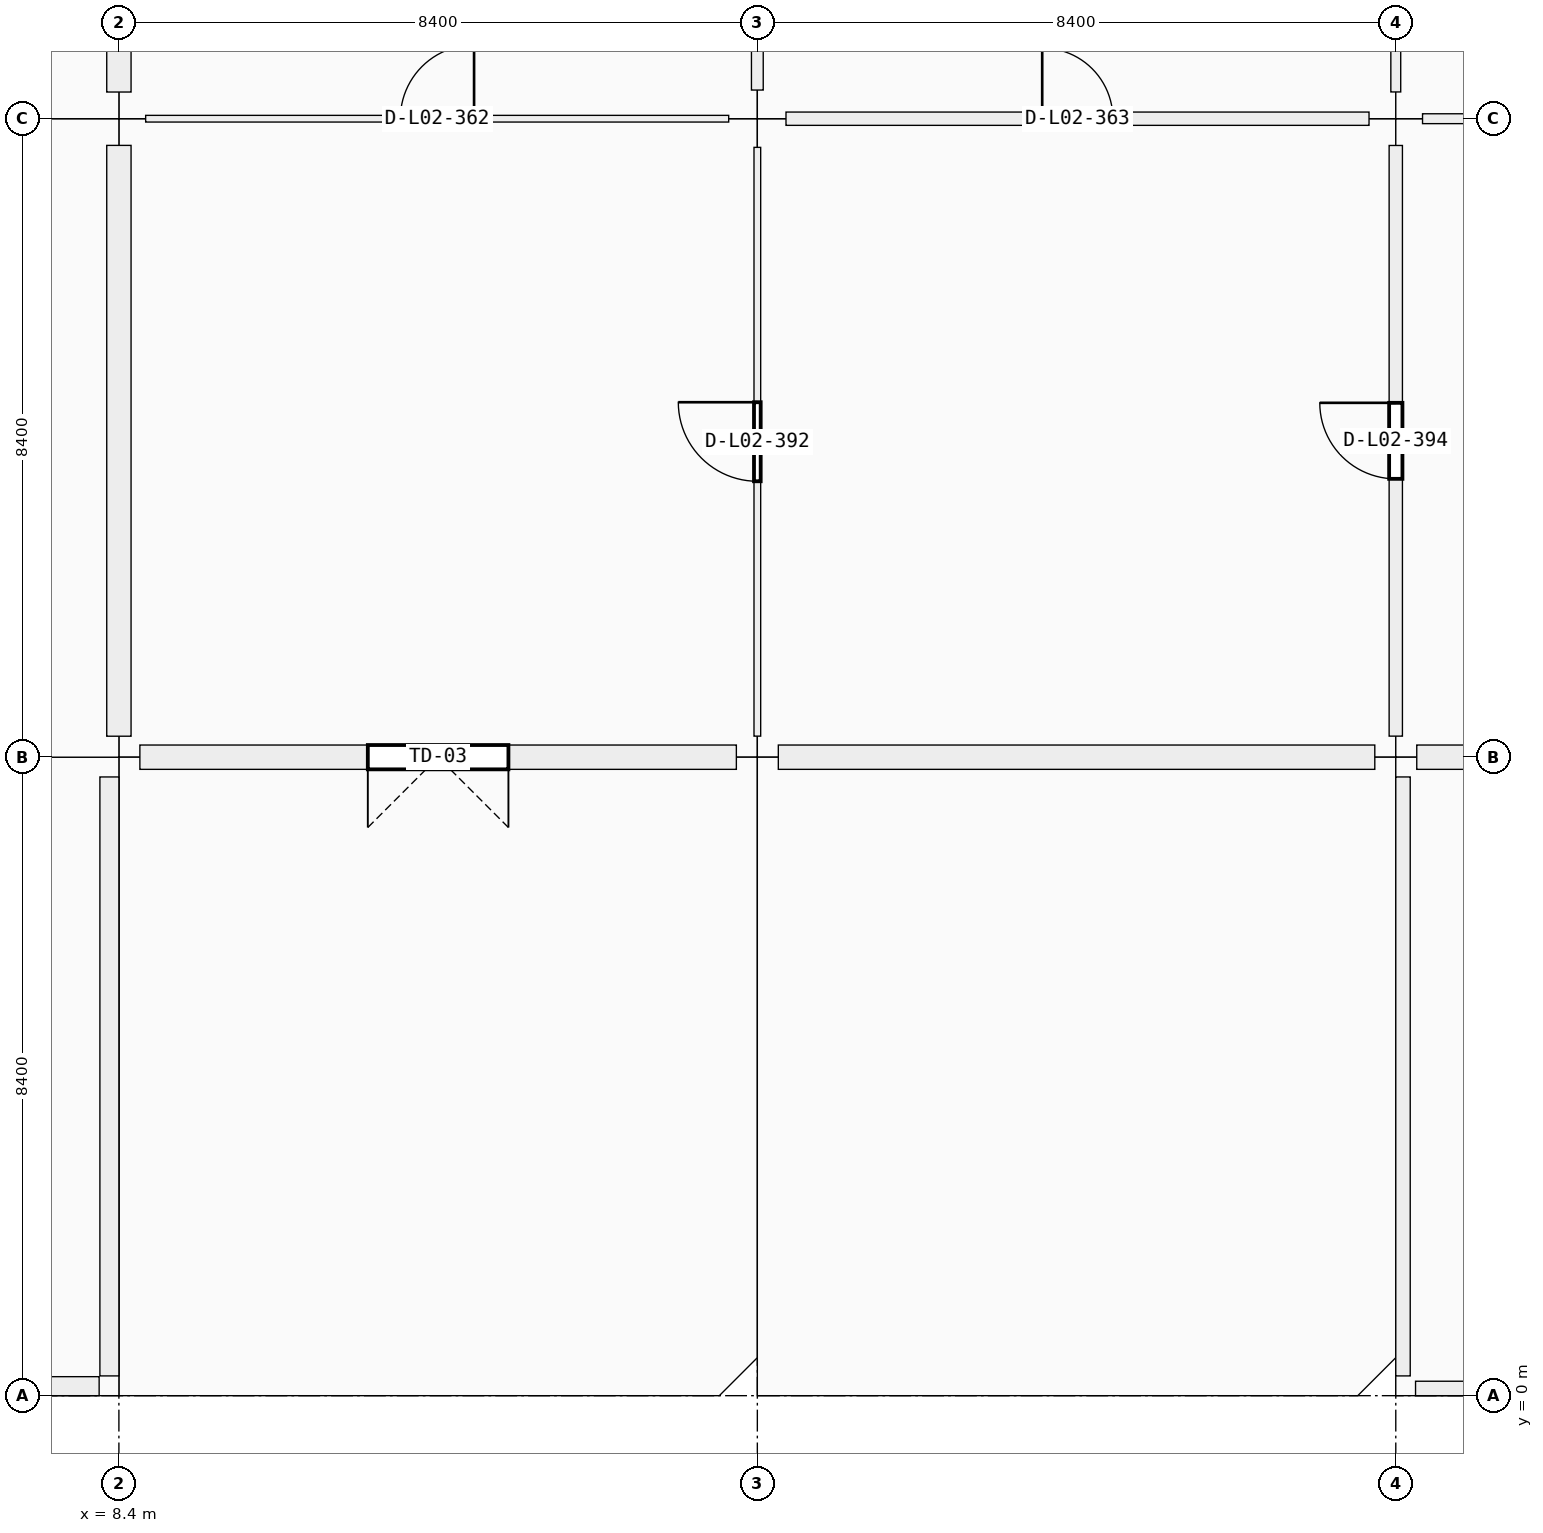
"""IFC4 building model, lengths in metres.
Left out: names, types, materials, properties, quantities, classifications, styles, units other than length and angle.
Written with IfcOpenShell. Run it as: python <this file> out.ifc"""

import sys

from ifc_helpers import new_model, si_unit, direction, frame, frame_2d, origin, origin_2d, place, context, subcontext, project, spatial, rectangle, extrude, element, fill, save


model = new_model("IFC4")
c1 = context("Model", 3, precision=1e-05, world=origin(), true_north=direction((0.0, 1.0)))
c2 = subcontext(c1, "Body", "Model", "MODEL_VIEW")
j1 = project(units=[si_unit("LENGTHUNIT", "METRE"), si_unit("PLANEANGLEUNIT", "RADIAN")], contexts=[c1])
p1 = place(None, origin())
s1 = spatial("IfcSite", under=j1, at=p1, CompositionType="ELEMENT")
p2 = place(p1, origin())
s2 = spatial("IfcBuilding", under=s1, at=p2, CompositionType="ELEMENT")
p3 = place(p2, frame((0.0, 0.0, 10.26)))
s3 = spatial("IfcBuildingStorey", under=s2, at=p3, CompositionType="ELEMENT", Elevation=10.26)
p4 = place(p3, frame((8.4, 8.4, 0.0), z_axis=(0.0, 0.0, 1.0), x_axis=(1.0, 0.0, 0.0)))
e1 = element("IfcColumn", 1, at=p4, inside=s3, PredefinedType="COLUMN", context=c2, shape_type="SweptSolid", body=[
    extrude(rectangle(XDim=0.55, YDim=0.55, at=origin_2d()), origin(), (0.0, 0.0, 1.0), 4.25),
])
p5 = place(p3, frame((8.4, 16.8, 0.0), z_axis=(0.0, 0.0, 1.0), x_axis=(1.0, 0.0, 0.0)))
e2 = element("IfcColumn", 2, at=p5, inside=s3, PredefinedType="COLUMN", context=c2, shape_type="SweptSolid", body=[
    extrude(rectangle(XDim=0.7, YDim=0.7, at=origin_2d()), origin(), (0.0, 0.0, 1.0), 4.5),
])
p6 = place(p3, frame((16.8, 8.4, 0.0), z_axis=(0.0, 0.0, 1.0), x_axis=(1.0, 0.0, 0.0)))
e3 = element("IfcColumn", 3, at=p6, inside=s3, PredefinedType="COLUMN", context=c2, shape_type="SweptSolid", body=[
    extrude(rectangle(XDim=0.55, YDim=0.55, at=origin_2d()), origin(), (0.0, 0.0, 1.0), 4.25),
])
p7 = place(p3, frame((16.8, 16.8, 0.0), z_axis=(0.0, 0.0, 1.0), x_axis=(1.0, 0.0, 0.0)))
e4 = element("IfcColumn", 4, at=p7, inside=s3, PredefinedType="COLUMN", context=c2, shape_type="SweptSolid", body=[
    extrude(rectangle(XDim=0.75, YDim=0.75, at=origin_2d()), origin(), (0.0, 0.0, 1.0), 4.5),
])
p8 = place(p3, frame((25.2, 8.4, 0.0), z_axis=(0.0, 0.0, 1.0), x_axis=(1.0, 0.0, 0.0)))
e5 = element("IfcColumn", 5, at=p8, inside=s3, PredefinedType="COLUMN", context=c2, shape_type="SweptSolid", body=[
    extrude(rectangle(XDim=0.55, YDim=0.55, at=origin_2d()), origin(), (0.0, 0.0, 1.0), 4.25),
])
p9 = place(p3, frame((25.2, 16.8, 0.0), z_axis=(0.0, 0.0, 1.0), x_axis=(1.0, 0.0, 0.0)))
e6 = element("IfcColumn", 6, at=p9, inside=s3, PredefinedType="COLUMN", context=c2, shape_type="SweptSolid", body=[
    extrude(rectangle(XDim=0.7, YDim=0.7, at=origin_2d()), origin(), (0.0, 0.0, 1.0), 4.5),
])
p10 = place(p3, frame((16.524, 8.4, 0.0), z_axis=(0.0, 0.0, 1.0), x_axis=(-1.0, 0.0, 0.0)))
e7 = element("IfcWall", 7, at=p10, inside=s3, PredefinedType="SOLIDWALL", context=c2, shape_type="SweptSolid", body=[
    extrude(rectangle(XDim=7.848, YDim=0.32, at=frame_2d((3.924, 0.0))), origin(), (0.0, 0.0, 1.0), 3.54),
])
p11 = place(p10, frame((2.999, 0.0, 0.0)))
e8 = element("IfcOpeningElement", 8, at=p11, cuts=e7, PredefinedType="OPENING", context=c2, shape_type="SweptSolid", body=[
    extrude(rectangle(XDim=1.85, YDim=2.2, at=frame_2d((0.925, 1.1))), frame((0.0, 0.16, 0.0), z_axis=(0.0, -1.0, 0.0), x_axis=(1.0, 0.0, 0.0)), (0.0, 0.0, 1.0), 0.32),
])
p12 = place(p3, frame((8.4, 8.676, 0.0), z_axis=(0.0, 0.0, 1.0), x_axis=(0.0, 1.0, 0.0)))
e9 = element("IfcWall", 9, at=p12, inside=s3, PredefinedType="SOLIDWALL", context=c2, shape_type="SweptSolid", body=[
    extrude(rectangle(XDim=7.773, YDim=0.32, at=frame_2d((3.886, 0.0))), origin(), (0.0, 0.0, 1.0), 3.54),
])
p13 = place(p12, frame((2.861, 0.0, 0.9)))
e10 = element("IfcOpeningElement", 10, at=p13, cuts=e9, PredefinedType="OPENING", context=c2, shape_type="SweptSolid", body=[
    extrude(rectangle(XDim=2.05, YDim=1.45, at=frame_2d((1.025, 0.725))), frame((0.0, 0.16, 0.0), z_axis=(0.0, -1.0, 0.0), x_axis=(1.0, 0.0, 0.0)), (0.0, 0.0, 1.0), 0.32),
])
p14 = place(p3, frame((8.4, 17.151, 0.0), z_axis=(0.0, 0.0, 1.0), x_axis=(0.0, 1.0, 0.0)))
e11 = element("IfcWall", 11, at=p14, inside=s3, PredefinedType="SOLIDWALL", context=c2, shape_type="SweptSolid", body=[
    extrude(rectangle(XDim=7.673, YDim=0.32, at=frame_2d((3.836, 0.0))), origin(), (0.0, 0.0, 1.0), 3.54),
])
p15 = place(p14, frame((2.611, 0.0, 0.9)))
e12 = element("IfcOpeningElement", 12, at=p15, cuts=e11, PredefinedType="OPENING", context=c2, shape_type="SweptSolid", body=[
    extrude(rectangle(XDim=2.45, YDim=1.45, at=frame_2d((1.225, 0.725))), frame((0.0, 0.16, 0.0), z_axis=(0.0, -1.0, 0.0), x_axis=(1.0, 0.0, 0.0)), (0.0, 0.0, 1.0), 0.32),
])
p16 = place(p3, frame((24.924, 8.4, 0.0), z_axis=(0.0, 0.0, 1.0), x_axis=(-1.0, 0.0, 0.0)))
e13 = element("IfcWall", 13, at=p16, inside=s3, PredefinedType="SOLIDWALL", context=c2, shape_type="SweptSolid", body=[
    extrude(rectangle(XDim=7.848, YDim=0.32, at=frame_2d((3.924, 0.0))), origin(), (0.0, 0.0, 1.0), 3.54),
])
p17 = place(p16, frame((3.099, 0.0, 0.0)))
e14 = element("IfcOpeningElement", 14, at=p17, cuts=e13, PredefinedType="OPENING", context=c2, shape_type="SweptSolid", body=[
    extrude(rectangle(XDim=1.65, YDim=2.2, at=frame_2d((0.825, 1.1))), frame((0.0, 0.16, 0.0), z_axis=(0.0, -1.0, 0.0), x_axis=(1.0, 0.0, 0.0)), (0.0, 0.0, 1.0), 0.32),
])
p18 = place(p3, frame((33.324, 8.4, 0.0), z_axis=(0.0, 0.0, 1.0), x_axis=(-1.0, 0.0, 0.0)))
e15 = element("IfcWall", 15, at=p18, inside=s3, PredefinedType="SOLIDWALL", context=c2, shape_type="SweptSolid", body=[
    extrude(rectangle(XDim=7.848, YDim=0.32, at=frame_2d((3.924, 0.0))), origin(), (0.0, 0.0, 1.0), 3.54),
])
p19 = place(p18, frame((3.174, 0.0, 0.9)))
e16 = element("IfcOpeningElement", 16, at=p19, cuts=e15, PredefinedType="OPENING", context=c2, shape_type="SweptSolid", body=[
    extrude(rectangle(XDim=1.5, YDim=1.8, at=frame_2d((0.75, 0.9))), frame((0.0, 0.16, 0.0), z_axis=(0.0, -1.0, 0.0), x_axis=(1.0, 0.0, 0.0)), (0.0, 0.0, 1.0), 0.32),
])
for number, where, z_axis, x_axis in (
    (17, (8.14, 0.125, 0.0), (0.0, 0.0, 1.0), (-1.0, 0.0, 0.0)),
    (18, (8.275, 8.14, 0.0), (0.0, 0.0, 1.0), (0.0, -1.0, 0.0)),
):
    element("IfcWall", number, at=place(p3, frame(where, z_axis=z_axis, x_axis=x_axis)), inside=s3, PredefinedType="PARAPET", context=c2, shape_type="SweptSolid", body=[
        extrude(rectangle(XDim=7.88, YDim=0.25, at=frame_2d((3.94, 0.0))), origin(), (0.0, 0.0, 1.0), 0.95),
    ])
p20 = place(p3, frame((33.34, 0.095, 0.0), z_axis=(0.0, 0.0, 1.0), x_axis=(-1.0, 0.0, 0.0)))
e19 = element("IfcWall", 19, at=p20, inside=s3, PredefinedType="PARAPET", context=c2, shape_type="SweptSolid", body=[
    extrude(rectangle(XDim=7.88, YDim=0.19, at=frame_2d((3.94, 0.0))), origin(), (0.0, 0.0, 1.0), 0.95),
])
p21 = place(p3, frame((25.295, 0.26, 0.0), z_axis=(0.0, 0.0, 1.0), x_axis=(0.0, 1.0, 0.0)))
e20 = element("IfcWall", 20, at=p21, inside=s3, PredefinedType="PARAPET", context=c2, shape_type="SweptSolid", body=[
    extrude(rectangle(XDim=7.88, YDim=0.19, at=frame_2d((3.94, 0.0))), origin(), (0.0, 0.0, 1.0), 0.95),
])
p22 = place(p3, frame((8.752, 16.8, 0.0), z_axis=(0.0, 0.0, 1.0), x_axis=(1.0, 0.0, 0.0)))
e21 = element("IfcWall", 21, at=p22, inside=s3, PredefinedType="PARTITIONING", context=c2, shape_type="SweptSolid", body=[
    extrude(rectangle(XDim=7.671, YDim=0.088, at=frame_2d((3.835, 0.0))), origin(), (0.0, 0.0, 1.0), 3.37),
])
p23 = place(p22, frame((3.351, 0.0, 0.0)))
e22 = element("IfcOpeningElement", 22, at=p23, cuts=e21, PredefinedType="OPENING", context=c2, shape_type="SweptSolid", body=[
    extrude(rectangle(XDim=0.97, YDim=2.12, at=frame_2d((0.485, 1.06))), frame((0.0, 0.044, 0.0), z_axis=(0.0, -1.0, 0.0), x_axis=(1.0, 0.0, 0.0)), (0.0, 0.0, 1.0), 0.088),
])
p24 = place(p3, frame((17.177, 16.8, 0.0), z_axis=(0.0, 0.0, 1.0), x_axis=(1.0, 0.0, 0.0)))
e23 = element("IfcWall", 23, at=p24, inside=s3, PredefinedType="PARTITIONING", context=c2, shape_type="SweptSolid", body=[
    extrude(rectangle(XDim=7.671, YDim=0.175, at=frame_2d((3.835, 0.0))), origin(), (0.0, 0.0, 1.0), 3.37),
])
p25 = place(p24, frame((3.371, 0.0, 0.0)))
e24 = element("IfcOpeningElement", 24, at=p25, cuts=e23, PredefinedType="OPENING", context=c2, shape_type="SweptSolid", body=[
    extrude(rectangle(XDim=0.93, YDim=2.12, at=frame_2d((0.465, 1.06))), frame((0.0, 0.087, 0.0), z_axis=(0.0, -1.0, 0.0), x_axis=(1.0, 0.0, 0.0)), (0.0, 0.0, 1.0), 0.175),
])
p26 = place(p3, frame((25.552, 16.8, 0.0), z_axis=(0.0, 0.0, 1.0), x_axis=(1.0, 0.0, 0.0)))
e25 = element("IfcWall", 25, at=p26, inside=s3, PredefinedType="MOVABLE", context=c2, shape_type="SweptSolid", body=[
    extrude(rectangle(XDim=7.671, YDim=0.13, at=frame_2d((3.835, 0.0))), origin(), (0.0, 0.0, 1.0), 3.37),
])
p27 = place(p26, frame((3.296, 0.0, 0.0)))
e26 = element("IfcOpeningElement", 26, at=p27, cuts=e25, PredefinedType="OPENING", context=c2, shape_type="SweptSolid", body=[
    extrude(rectangle(XDim=1.08, YDim=2.25, at=frame_2d((0.54, 1.125))), frame((0.0, 0.065, 0.0), z_axis=(0.0, -1.0, 0.0), x_axis=(1.0, 0.0, 0.0)), (0.0, 0.0, 1.0), 0.13),
])
p28 = place(p3, frame((16.8, 8.677, 0.0), z_axis=(0.0, 0.0, 1.0), x_axis=(0.0, 1.0, 0.0)))
e27 = element("IfcWall", 27, at=p28, inside=s3, PredefinedType="PARTITIONING", context=c2, shape_type="SweptSolid", body=[
    extrude(rectangle(XDim=7.746, YDim=0.088, at=frame_2d((3.873, 0.0))), origin(), (0.0, 0.0, 1.0), 3.37),
])
p29 = place(p28, frame((3.353, 0.0, 0.0)))
e28 = element("IfcOpeningElement", 28, at=p29, cuts=e27, PredefinedType="OPENING", context=c2, shape_type="SweptSolid", body=[
    extrude(rectangle(XDim=1.04, YDim=2.2, at=frame_2d((0.52, 1.1))), frame((0.0, 0.044, 0.0), z_axis=(0.0, -1.0, 0.0), x_axis=(1.0, 0.0, 0.0)), (0.0, 0.0, 1.0), 0.088),
])
p30 = place(p3, frame((16.8, 17.177, 0.0), z_axis=(0.0, 0.0, 1.0), x_axis=(0.0, 1.0, 0.0)))
e29 = element("IfcWall", 29, at=p30, inside=s3, PredefinedType="PARTITIONING", context=c2, shape_type="SweptSolid", body=[
    extrude(rectangle(XDim=7.671, YDim=0.155, at=frame_2d((3.835, 0.0))), origin(), (0.0, 0.0, 1.0), 3.37),
])
p31 = place(p30, frame((3.325, 0.0, 0.0)))
e30 = element("IfcOpeningElement", 30, at=p31, cuts=e29, PredefinedType="OPENING", context=c2, shape_type="SweptSolid", body=[
    extrude(rectangle(XDim=1.02, YDim=2.2, at=frame_2d((0.51, 1.1))), frame((0.0, 0.078, 0.0), z_axis=(0.0, -1.0, 0.0), x_axis=(1.0, 0.0, 0.0)), (0.0, 0.0, 1.0), 0.155),
])
p32 = place(p3, frame((25.2, 8.677, 0.0), z_axis=(0.0, 0.0, 1.0), x_axis=(0.0, 1.0, 0.0)))
e31 = element("IfcWall", 31, at=p32, inside=s3, PredefinedType="PARTITIONING", context=c2, shape_type="SweptSolid", body=[
    extrude(rectangle(XDim=7.771, YDim=0.175, at=frame_2d((3.885, 0.0))), origin(), (0.0, 0.0, 1.0), 3.37),
])
p33 = place(p32, frame((3.385, 0.0, 0.0)))
e32 = element("IfcOpeningElement", 32, at=p33, cuts=e31, PredefinedType="OPENING", context=c2, shape_type="SweptSolid", body=[
    extrude(rectangle(XDim=1.0, YDim=2.2, at=frame_2d((0.5, 1.1))), frame((0.0, 0.087, 0.0), z_axis=(0.0, -1.0, 0.0), x_axis=(1.0, 0.0, 0.0)), (0.0, 0.0, 1.0), 0.175),
])
p34 = place(p3, frame((25.2, 17.152, 0.0), z_axis=(0.0, 0.0, 1.0), x_axis=(0.0, 1.0, 0.0)))
e33 = element("IfcWall", 33, at=p34, inside=s3, PredefinedType="MOVABLE", context=c2, shape_type="SweptSolid", body=[
    extrude(rectangle(XDim=7.671, YDim=0.13, at=frame_2d((3.835, 0.0))), origin(), (0.0, 0.0, 1.0), 3.37),
])
p35 = place(p34, frame((3.346, 0.0, 0.0)))
e34 = element("IfcOpeningElement", 34, at=p35, cuts=e33, PredefinedType="OPENING", context=c2, shape_type="SweptSolid", body=[
    extrude(rectangle(XDim=0.98, YDim=2.18, at=frame_2d((0.49, 1.09))), frame((0.0, 0.065, 0.0), z_axis=(0.0, -1.0, 0.0), x_axis=(1.0, 0.0, 0.0)), (0.0, 0.0, 1.0), 0.13),
])
p36 = place(p11, origin())
e35 = element("IfcDoor", 35, at=p36, inside=s3, OperationType="DOUBLE_DOOR_SINGLE_SWING", PredefinedType="DOOR", context=c2, shape_type="SweptSolid", body=[
    extrude(rectangle(XDim=1.85, YDim=2.2, at=frame_2d((0.925, 1.1))), frame((0.0, 0.025, 0.0), z_axis=(0.0, -1.0, 0.0), x_axis=(1.0, 0.0, 0.0)), (0.0, 0.0, 1.0), 0.05),
])
fill(e8, e35)
p37 = place(p13, origin())
e36 = element("IfcWindow", 36, at=p37, inside=s3, PartitioningType="SINGLE_PANEL", PredefinedType="WINDOW", context=c2, shape_type="SweptSolid", body=[
    extrude(rectangle(XDim=2.05, YDim=1.45, at=frame_2d((1.025, 0.725))), frame((0.0, 0.03, 0.0), z_axis=(0.0, -1.0, 0.0), x_axis=(1.0, 0.0, 0.0)), (0.0, 0.0, 1.0), 0.06),
])
fill(e10, e36)
p38 = place(p17, origin())
e37 = element("IfcDoor", 37, at=p38, inside=s3, OperationType="DOUBLE_DOOR_SINGLE_SWING", PredefinedType="DOOR", context=c2, shape_type="SweptSolid", body=[
    extrude(rectangle(XDim=1.65, YDim=2.2, at=frame_2d((0.825, 1.1))), frame((0.0, 0.025, 0.0), z_axis=(0.0, -1.0, 0.0), x_axis=(1.0, 0.0, 0.0)), (0.0, 0.0, 1.0), 0.05),
])
fill(e14, e37)
p39 = place(p23, origin())
e38 = element("IfcDoor", 38, at=p39, inside=s3, OperationType="SINGLE_SWING_RIGHT", PredefinedType="DOOR", context=c2, shape_type="SweptSolid", body=[
    extrude(rectangle(XDim=0.97, YDim=2.12, at=frame_2d((0.485, 1.06))), frame((0.0, 0.025, 0.0), z_axis=(0.0, -1.0, 0.0), x_axis=(1.0, 0.0, 0.0)), (0.0, 0.0, 1.0), 0.05),
])
fill(e22, e38)
p40 = place(p25, origin())
e39 = element("IfcDoor", 39, at=p40, inside=s3, OperationType="SINGLE_SWING_LEFT", PredefinedType="DOOR", context=c2, shape_type="SweptSolid", body=[
    extrude(rectangle(XDim=0.93, YDim=2.12, at=frame_2d((0.465, 1.06))), frame((0.0, 0.025, 0.0), z_axis=(0.0, -1.0, 0.0), x_axis=(1.0, 0.0, 0.0)), (0.0, 0.0, 1.0), 0.05),
])
fill(e24, e39)
p41 = place(p29, origin())
e40 = element("IfcDoor", 40, at=p41, inside=s3, OperationType="SINGLE_SWING_RIGHT", PredefinedType="DOOR", context=c2, shape_type="SweptSolid", body=[
    extrude(rectangle(XDim=1.04, YDim=2.2, at=frame_2d((0.52, 1.1))), frame((0.0, 0.025, 0.0), z_axis=(0.0, -1.0, 0.0), x_axis=(1.0, 0.0, 0.0)), (0.0, 0.0, 1.0), 0.05),
])
fill(e28, e40)
p42 = place(p33, origin())
e41 = element("IfcDoor", 41, at=p42, inside=s3, OperationType="SINGLE_SWING_RIGHT", PredefinedType="DOOR", context=c2, shape_type="SweptSolid", body=[
    extrude(rectangle(XDim=1.0, YDim=2.2, at=frame_2d((0.5, 1.1))), frame((0.0, 0.025, 0.0), z_axis=(0.0, -1.0, 0.0), x_axis=(1.0, 0.0, 0.0)), (0.0, 0.0, 1.0), 0.05),
])
fill(e32, e41)
save(model, sys.argv[1])
